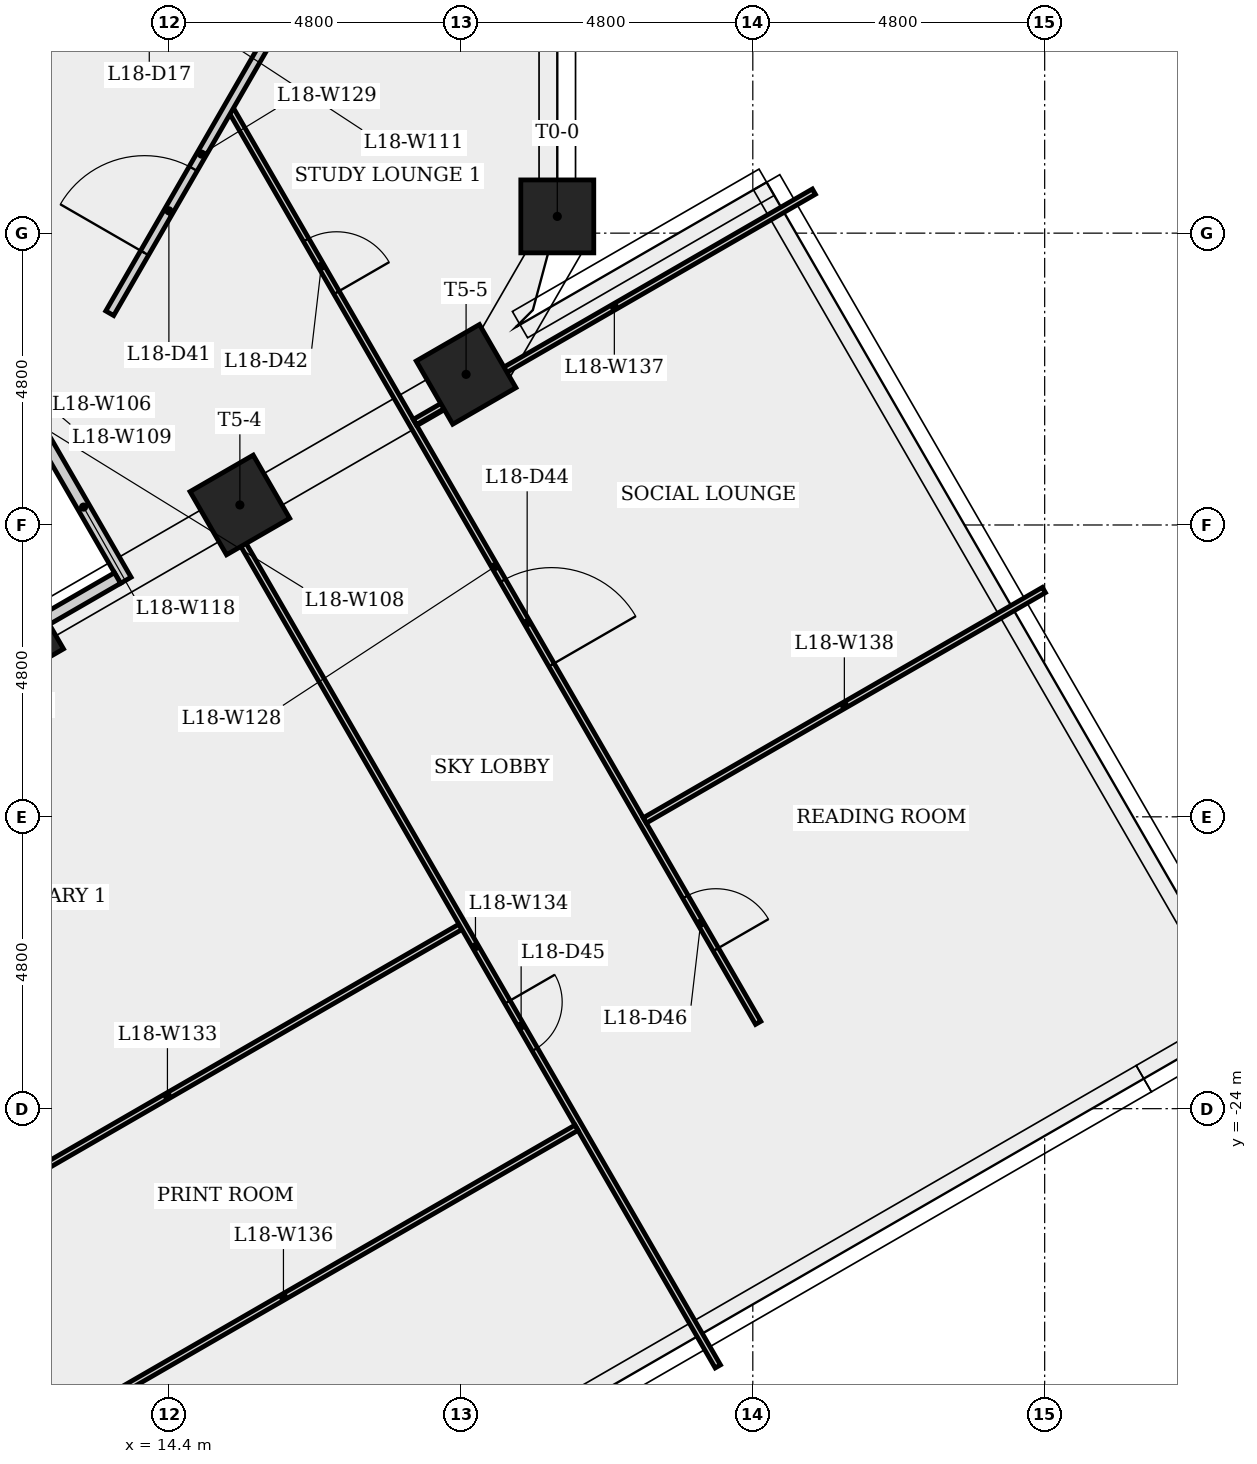
"""IFC4 building model, lengths in metres.
Left out: names, types, materials, properties, quantities, classifications, styles, units other than length and angle.
Written with IfcOpenShell. Run it as: python <this file> out.ifc"""

import sys

from ifc_helpers import new_model, si_unit, direction, frame, frame_2d, origin, origin_2d, place, context, subcontext, project, spatial, rectangle, extrude, element, fill, save


model = new_model("IFC4")
c1 = context("Model", 3, precision=1e-05, world=origin(), true_north=direction((0.0, 1.0)))
c2 = subcontext(c1, "Body", "Model", "MODEL_VIEW")
j1 = project(units=[si_unit("LENGTHUNIT", "METRE"), si_unit("PLANEANGLEUNIT", "RADIAN")], contexts=[c1])
p1 = place(None, origin())
s1 = spatial("IfcSite", under=j1, at=p1, CompositionType="ELEMENT")
p2 = place(p1, origin())
s2 = spatial("IfcBuilding", under=s1, at=p2, CompositionType="ELEMENT")
p3 = place(p2, frame((0.0, 0.0, 70.3)))
s3 = spatial("IfcBuildingStorey", under=s2, at=p3, CompositionType="ELEMENT", Elevation=70.3)
for number, where, z_axis, x_axis in (
    (1, (20.785, -9.325, 0.0), (0.0, 0.0, 1.0), (1.0, 0.0, 0.0)),
    (2, (11.844, -16.219, 0.0), (0.0, 0.0, 1.0), (0.5, -0.866, 0.0)),
    (3, (15.564, -14.071, 0.0), (0.0, 0.0, 1.0), (0.5, -0.866, 0.0)),
    (4, (19.285, -11.923, 0.0), (0.0, 0.0, 1.0), (0.5, -0.866, 0.0)),
):
    element("IfcColumn", number, at=place(p3, frame(where, z_axis=z_axis, x_axis=x_axis)), inside=s3, PredefinedType="COLUMN", context=c2, shape_type="SweptSolid", body=[
        extrude(rectangle(XDim=1.2, YDim=1.2, at=origin_2d()), origin(), (0.0, 0.0, 1.0), 4.0),
    ])
p4 = place(p3, frame((5.727, -20.047, 0.0), z_axis=(0.0, 0.0, 1.0), x_axis=(0.49999285859, -0.86602952684, 0.0)))
e5 = element("IfcWall", 5, at=p4, inside=s3, PredefinedType="PARTITIONING", context=c2, shape_type="SweptSolid", body=[
    extrude(rectangle(XDim=15.944, YDim=0.1, at=frame_2d((7.972, 0.0))), origin(), (0.0, 0.0, 1.0), 3.6),
])
p5 = place(p4, frame((2.968, 0.0, 0.0)))
e6 = element("IfcOpeningElement", 6, at=p5, cuts=e5, PredefinedType="OPENING", context=c2, shape_type="SweptSolid", body=[
    extrude(rectangle(XDim=1.6, YDim=2.1, at=frame_2d((0.8, 1.05))), frame((0.0, 0.06, 0.0), z_axis=(0.0, -1.0, 0.0), x_axis=(1.0, 0.0, 0.0)), (0.0, 0.0, 1.0), 0.12),
])
p6 = place(p4, frame((12.805, 0.0, 0.0)))
e7 = element("IfcOpeningElement", 7, at=p6, cuts=e5, PredefinedType="OPENING", context=c2, shape_type="SweptSolid", body=[
    extrude(rectangle(XDim=1.0, YDim=2.1, at=frame_2d((0.5, 1.05))), frame((0.0, 0.06, 0.0), z_axis=(0.0, -1.0, 0.0), x_axis=(1.0, 0.0, 0.0)), (0.0, 0.0, 1.0), 0.12),
])
p7 = place(p3, frame((12.299, -12.902, 0.0), z_axis=(0.0, 0.0, 1.0), x_axis=(0.500049332001, -0.865996920067, 0.0)))
e8 = element("IfcWall", 8, at=p7, inside=s3, PredefinedType="PLUMBINGWALL", context=c2, shape_type="SweptSolid", body=[
    extrude(rectangle(XDim=2.78, YDim=0.2, at=frame_2d((1.39, 0.0))), origin(), (0.0, 0.0, 1.0), 3.6),
])
p8 = place(p3, frame((13.552, -15.273, 0.0), z_axis=(0.0, 0.0, 1.0), x_axis=(-0.866008294434, -0.500029633093, 0.0)))
e9 = element("IfcWall", 9, at=p8, inside=s3, PredefinedType="PLUMBINGWALL", context=c2, shape_type="SweptSolid", body=[
    extrude(rectangle(XDim=4.38, YDim=0.2, at=frame_2d((2.19, 0.0))), origin(), (0.0, 0.0, 1.0), 2.675),
])
p9 = place(p3, frame((15.425, -7.583, 0.0), z_axis=(0.0, 0.0, 1.0), x_axis=(0.499995650065, -0.866027915206, 0.0)))
e10 = element("IfcWall", 10, at=p9, inside=s3, PredefinedType="PARTITIONING", context=c2, shape_type="SweptSolid", body=[
    extrude(rectangle(XDim=17.328, YDim=0.1, at=frame_2d((8.664, 0.0))), origin(), (0.0, 0.0, 1.0), 3.6),
])
p10 = place(p9, frame((2.458, 0.0, 0.0)))
e11 = element("IfcOpeningElement", 11, at=p10, cuts=e10, PredefinedType="OPENING", context=c2, shape_type="SweptSolid", body=[
    extrude(rectangle(XDim=1.0, YDim=2.1, at=frame_2d((0.5, 1.05))), frame((0.0, 0.06, 0.0), z_axis=(0.0, -1.0, 0.0), x_axis=(1.0, 0.0, 0.0)), (0.0, 0.0, 1.0), 0.12),
])
p11 = place(p9, frame((8.929, 0.0, 0.0)))
e12 = element("IfcOpeningElement", 12, at=p11, cuts=e10, PredefinedType="OPENING", context=c2, shape_type="SweptSolid", body=[
    extrude(rectangle(XDim=1.6, YDim=2.1, at=frame_2d((0.8, 1.05))), frame((0.0, 0.06, 0.0), z_axis=(0.0, -1.0, 0.0), x_axis=(1.0, 0.0, 0.0)), (0.0, 0.0, 1.0), 0.12),
])
p12 = place(p9, frame((14.935, 0.0, 0.0)))
e13 = element("IfcOpeningElement", 13, at=p12, cuts=e10, PredefinedType="OPENING", context=c2, shape_type="SweptSolid", body=[
    extrude(rectangle(XDim=1.0, YDim=2.1, at=frame_2d((0.5, 1.05))), frame((0.0, 0.06, 0.0), z_axis=(0.0, -1.0, 0.0), x_axis=(1.0, 0.0, 0.0)), (0.0, 0.0, 1.0), 0.12),
])
p13 = place(p3, frame((13.424, -10.918, 0.0), z_axis=(0.0, 0.0, 1.0), x_axis=(0.499992877875, 0.866029515706, 0.0)))
e14 = element("IfcWall", 14, at=p13, inside=s3, PredefinedType="PARTITIONING", context=c2, shape_type="SweptSolid", body=[
    extrude(rectangle(XDim=6.043, YDim=0.15, at=frame_2d((3.022, 0.0))), origin(), (0.0, 0.0, 1.0), 3.6),
])
p14 = place(p13, frame((1.146, 0.0, 0.0)))
e15 = element("IfcOpeningElement", 15, at=p14, cuts=e14, PredefinedType="OPENING", context=c2, shape_type="SweptSolid", body=[
    extrude(rectangle(XDim=1.6, YDim=2.1, at=frame_2d((0.8, 1.05))), frame((0.0, 0.085, 0.0), z_axis=(0.0, -1.0, 0.0), x_axis=(1.0, 0.0, 0.0)), (0.0, 0.0, 1.0), 0.17),
])
p15 = place(p3, frame((19.193, -21.009, 0.0), z_axis=(0.0, 0.0, 1.0), x_axis=(-0.866020851292, -0.500007885066, 0.0)))
e16 = element("IfcWall", 16, at=p15, inside=s3, PredefinedType="PARTITIONING", context=c2, shape_type="SweptSolid", body=[
    extrude(rectangle(XDim=11.131, YDim=0.1, at=frame_2d((5.565, 0.0))), origin(), (0.0, 0.0, 1.0), 3.6),
])
p16 = place(p3, frame((15.453, -14.432, 0.0), z_axis=(0.0, 0.0, 1.0), x_axis=(0.49999285859, -0.86602952684, 0.0)))
e17 = element("IfcWall", 17, at=p16, inside=s3, PredefinedType="PARTITIONING", context=c2, shape_type="SweptSolid", body=[
    extrude(rectangle(XDim=15.944, YDim=0.1, at=frame_2d((7.972, 0.0))), origin(), (0.0, 0.0, 1.0), 3.6),
])
p17 = place(p16, frame((9.024, 0.0, 0.0)))
e18 = element("IfcOpeningElement", 18, at=p17, cuts=e17, PredefinedType="OPENING", context=c2, shape_type="SweptSolid", body=[
    extrude(rectangle(XDim=0.9, YDim=2.1, at=frame_2d((0.45, 1.05))), frame((0.0, 0.06, 0.0), z_axis=(0.0, -1.0, 0.0), x_axis=(1.0, 0.0, 0.0)), (0.0, 0.0, 1.0), 0.12),
])
p18 = place(p3, frame((21.101, -24.314, 0.0), z_axis=(0.0, 0.0, 1.0), x_axis=(-0.866030349048, -0.499991434454, 0.0)))
e19 = element("IfcWall", 19, at=p18, inside=s3, PredefinedType="PARTITIONING", context=c2, shape_type="SweptSolid", body=[
    extrude(rectangle(XDim=11.131, YDim=0.1, at=frame_2d((5.565, 0.0))), origin(), (0.0, 0.0, 1.0), 3.6),
])
p19 = place(p3, frame((25.005, -8.917, 0.0), z_axis=(0.0, 0.0, 1.0), x_axis=(-0.866026268399, -0.49999850244, 0.0)))
e20 = element("IfcWall", 20, at=p19, inside=s3, PredefinedType="PARTITIONING", context=c2, shape_type="SweptSolid", body=[
    extrude(rectangle(XDim=7.579, YDim=0.1, at=frame_2d((3.79, 0.0))), origin(), (0.0, 0.0, 1.0), 2.675),
])
p20 = place(p3, frame((28.788, -15.469, 0.0), z_axis=(0.0, 0.0, 1.0), x_axis=(-0.866034321076, -0.49998455448, 0.0)))
e21 = element("IfcWall", 21, at=p20, inside=s3, PredefinedType="PARTITIONING", context=c2, shape_type="SweptSolid", body=[
    extrude(rectangle(XDim=7.579, YDim=0.1, at=frame_2d((3.79, 0.0))), origin(), (0.0, 0.0, 1.0), 3.6),
])
p21 = place(p14, origin())
e22 = element("IfcDoor", 22, at=p21, inside=s3, OperationType="SINGLE_SWING_LEFT", PredefinedType="DOOR", context=c2, shape_type="SweptSolid", body=[
    extrude(rectangle(XDim=1.6, YDim=2.1, at=frame_2d((0.8, 1.05))), frame((0.0, 0.025, 0.0), z_axis=(0.0, -1.0, 0.0), x_axis=(1.0, 0.0, 0.0)), (0.0, 0.0, 1.0), 0.05),
])
fill(e15, e22)
p22 = place(p10, origin())
e23 = element("IfcDoor", 23, at=p22, inside=s3, OperationType="SINGLE_SWING_RIGHT", PredefinedType="DOOR", context=c2, shape_type="SweptSolid", body=[
    extrude(rectangle(XDim=1.0, YDim=2.1, at=frame_2d((0.5, 1.05))), frame((0.0, 0.025, 0.0), z_axis=(0.0, -1.0, 0.0), x_axis=(1.0, 0.0, 0.0)), (0.0, 0.0, 1.0), 0.05),
])
fill(e11, e23)
p23 = place(p11, origin())
e24 = element("IfcDoor", 24, at=p23, inside=s3, OperationType="SINGLE_SWING_RIGHT", PredefinedType="DOOR", context=c2, shape_type="SweptSolid", body=[
    extrude(rectangle(XDim=1.6, YDim=2.1, at=frame_2d((0.8, 1.05))), frame((0.0, 0.025, 0.0), z_axis=(0.0, -1.0, 0.0), x_axis=(1.0, 0.0, 0.0)), (0.0, 0.0, 1.0), 0.05),
])
fill(e12, e24)
p24 = place(p17, origin())
e25 = element("IfcDoor", 25, at=p24, inside=s3, OperationType="SINGLE_SWING_LEFT", PredefinedType="DOOR", context=c2, shape_type="SweptSolid", body=[
    extrude(rectangle(XDim=0.9, YDim=2.1, at=frame_2d((0.45, 1.05))), frame((0.0, 0.025, 0.0), z_axis=(0.0, -1.0, 0.0), x_axis=(1.0, 0.0, 0.0)), (0.0, 0.0, 1.0), 0.05),
])
fill(e18, e25)
p25 = place(p12, origin())
e26 = element("IfcDoor", 26, at=p25, inside=s3, OperationType="SINGLE_SWING_RIGHT", PredefinedType="DOOR", context=c2, shape_type="SweptSolid", body=[
    extrude(rectangle(XDim=1.0, YDim=2.1, at=frame_2d((0.5, 1.05))), frame((0.0, 0.025, 0.0), z_axis=(0.0, -1.0, 0.0), x_axis=(1.0, 0.0, 0.0)), (0.0, 0.0, 1.0), 0.05),
])
fill(e13, e26)
save(model, sys.argv[1])
